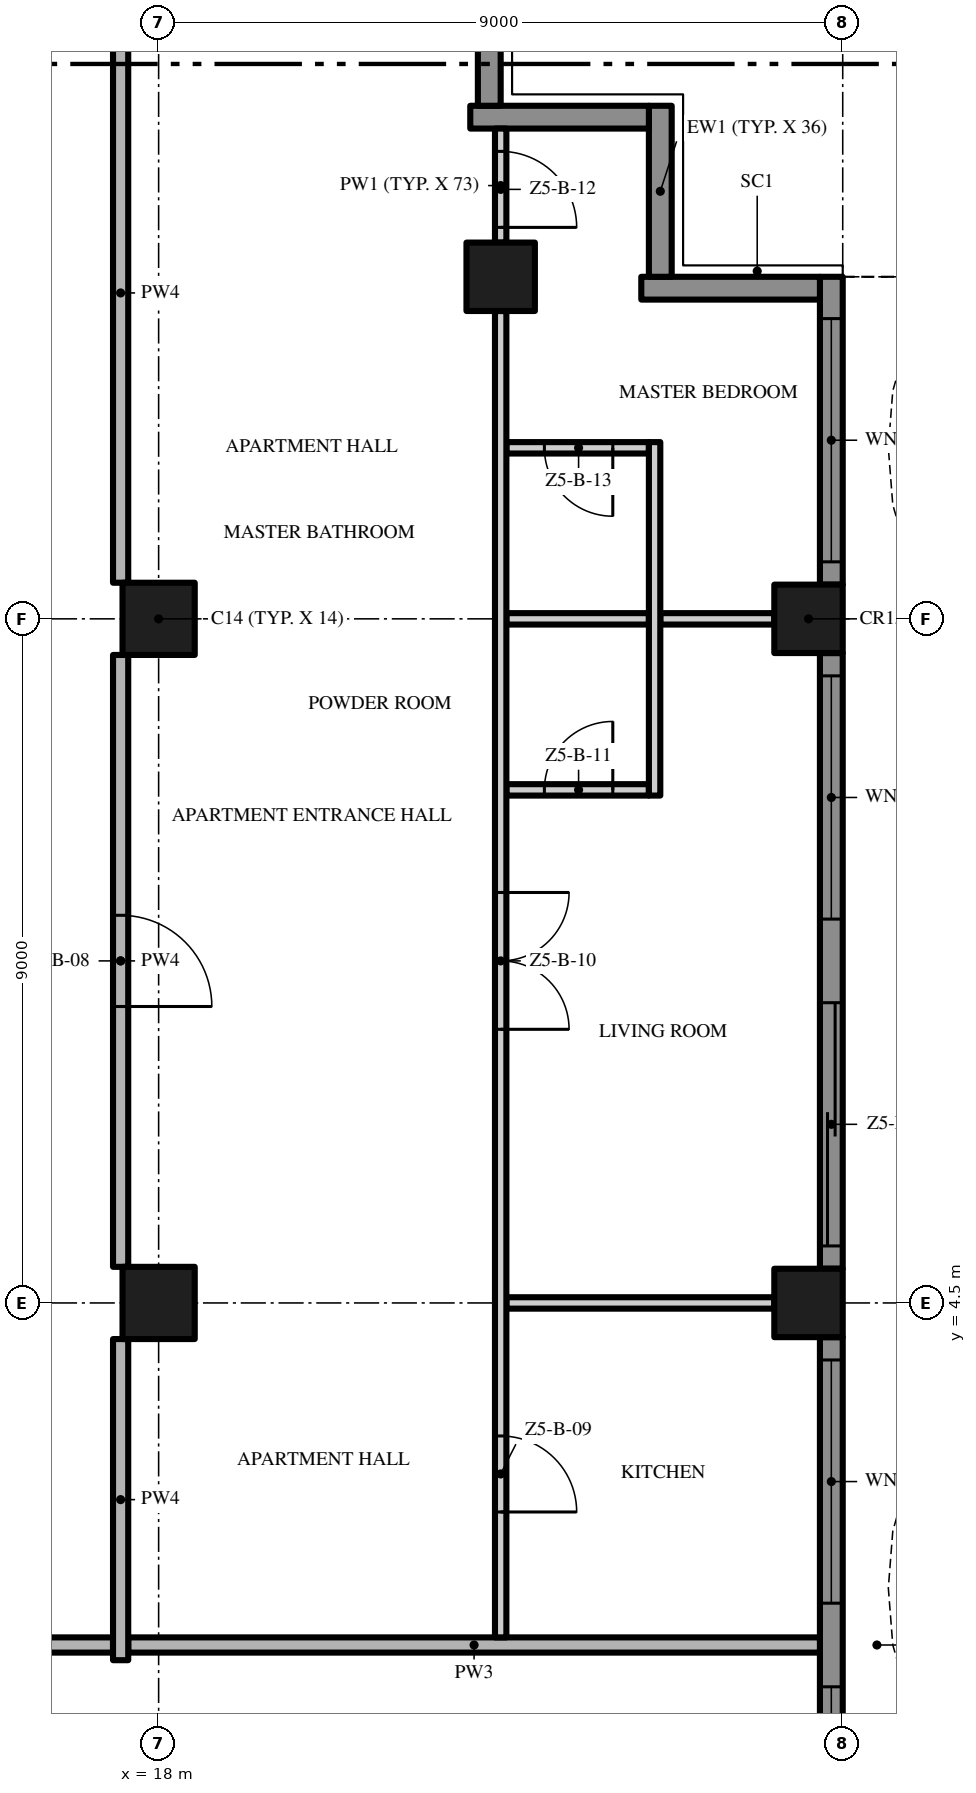
"""IFC4 building model, lengths in metres.
Left out: names, types, materials, properties, quantities, classifications, styles, units other than length and angle.
Written with IfcOpenShell. Run it as: python <this file> out.ifc"""

import sys

from ifc_helpers import new_model, si_unit, direction, frame, frame_2d, origin, origin_2d, place, context, subcontext, project, spatial, polyline, rectangle, outline, extrude, element, fill, save


model = new_model("IFC4")
c1 = context("Model", 3, precision=1e-05, world=origin(), true_north=direction((0.0, 1.0)))
c2 = subcontext(c1, "Body", "Model", "MODEL_VIEW")
j1 = project(units=[si_unit("LENGTHUNIT", "METRE"), si_unit("PLANEANGLEUNIT", "RADIAN")], contexts=[c1])
p1 = place(None, origin())
s1 = spatial("IfcSite", under=j1, at=p1, CompositionType="ELEMENT")
p2 = place(p1, origin())
s2 = spatial("IfcBuilding", under=s1, at=p2, CompositionType="ELEMENT")
p3 = place(p2, frame((0.0, 0.0, 257.8)))
s3 = spatial("IfcBuildingStorey", under=s2, at=p3, CompositionType="ELEMENT", Elevation=257.8)
for number, where, z_axis, x_axis in (
    (1, (18.0, 13.5, 0.0), (0.0, 0.0, 1.0), (1.0, 0.0, 0.0)),
    (2, (18.0, 4.5, 0.0), (0.0, 0.0, 1.0), (1.0, 0.0, 0.0)),
):
    element("IfcColumn", number, at=place(p3, frame(where, z_axis=z_axis, x_axis=x_axis)), inside=s3, PredefinedType="COLUMN", context=c2, shape_type="SweptSolid", body=[
        extrude(rectangle(XDim=0.95, YDim=0.95, at=origin_2d()), origin(), (0.0, 0.0, 1.0), 3.5),
    ])
for number, where, z_axis, x_axis in (
    (3, (26.55, 13.5, 0.0), (0.0, 0.0, 1.0), (1.0, 0.0, 0.0)),
    (4, (22.5, 18.0, 0.0), (0.0, 0.0, 1.0), (1.0, 0.0, 0.0)),
    (5, (26.55, 4.5, 0.0), (0.0, 0.0, 1.0), (1.0, 0.0, 0.0)),
):
    element("IfcColumn", number, at=place(p3, frame(where, z_axis=z_axis, x_axis=x_axis)), inside=s3, PredefinedType="COLUMN", context=c2, shape_type="SweptSolid", body=[
        extrude(rectangle(XDim=0.9, YDim=0.9, at=origin_2d()), origin(), (0.0, 0.0, 1.0), 3.5),
    ])
p4 = place(p3, frame((26.85, 4.05, 0.0), z_axis=(0.0, 0.0, 1.0), x_axis=(0.0, -1.0, 0.0)))
e6 = element("IfcWall", 6, at=p4, inside=s3, PredefinedType="SOLIDWALL", context=c2, shape_type="SweptSolid", body=[
    extrude(rectangle(XDim=8.1, YDim=0.3, at=frame_2d((4.05, 0.0))), origin(), (0.0, 0.0, 1.0), 3.5),
])
p5 = place(p4, frame((4.6, 0.0, 0.45)))
e7 = element("IfcOpeningElement", 7, at=p5, cuts=e6, PredefinedType="OPENING", context=c2, shape_type="SweptSolid", body=[
    extrude(rectangle(XDim=3.2, YDim=2.65, at=frame_2d((1.6, 1.325))), frame((0.0, 0.16, 0.0), z_axis=(0.0, -1.0, 0.0), x_axis=(1.0, 0.0, 0.0)), (0.0, 0.0, 1.0), 0.32),
])
p6 = place(p4, frame((0.3, 0.0, 0.45)))
e8 = element("IfcOpeningElement", 8, at=p6, cuts=e6, PredefinedType="OPENING", context=c2, shape_type="SweptSolid", body=[
    extrude(rectangle(XDim=3.2, YDim=2.65, at=frame_2d((1.6, 1.325))), frame((0.0, 0.16, 0.0), z_axis=(0.0, -1.0, 0.0), x_axis=(1.0, 0.0, 0.0)), (0.0, 0.0, 1.0), 0.32),
])
p7 = place(p3, frame((26.85, 13.05, 0.0), z_axis=(0.0, 0.0, 1.0), x_axis=(0.0, -1.0, 0.0)))
e9 = element("IfcWall", 9, at=p7, inside=s3, PredefinedType="SOLIDWALL", context=c2, shape_type="SweptSolid", body=[
    extrude(rectangle(XDim=8.1, YDim=0.3, at=frame_2d((4.05, 0.0))), origin(), (0.0, 0.0, 1.0), 3.5),
])
p8 = place(p7, frame((4.6, 0.0, 0.0)))
e10 = element("IfcOpeningElement", 10, at=p8, cuts=e9, PredefinedType="OPENING", context=c2, shape_type="SweptSolid", body=[
    extrude(rectangle(XDim=3.2, YDim=2.4, at=frame_2d((1.6, 1.2))), frame((0.0, 0.16, 0.0), z_axis=(0.0, -1.0, 0.0), x_axis=(1.0, 0.0, 0.0)), (0.0, 0.0, 1.0), 0.32),
])
p9 = place(p7, frame((0.3, 0.0, 0.45)))
e11 = element("IfcOpeningElement", 11, at=p9, cuts=e9, PredefinedType="OPENING", context=c2, shape_type="SweptSolid", body=[
    extrude(rectangle(XDim=3.2, YDim=2.65, at=frame_2d((1.6, 1.325))), frame((0.0, 0.16, 0.0), z_axis=(0.0, -1.0, 0.0), x_axis=(1.0, 0.0, 0.0)), (0.0, 0.0, 1.0), 0.32),
])
p10 = place(p3, frame((26.85, 18.0, 0.0), z_axis=(0.0, 0.0, 1.0), x_axis=(0.0, -1.0, 0.0)))
e12 = element("IfcWall", 12, at=p10, inside=s3, PredefinedType="SOLIDWALL", context=c2, shape_type="SweptSolid", body=[
    extrude(rectangle(XDim=4.05, YDim=0.3, at=frame_2d((2.025, 0.0))), origin(), (0.0, 0.0, 1.0), 3.5),
])
p11 = place(p10, frame((0.55, 0.0, 0.45)))
e13 = element("IfcOpeningElement", 13, at=p11, cuts=e12, PredefinedType="OPENING", context=c2, shape_type="SweptSolid", body=[
    extrude(rectangle(XDim=3.2, YDim=2.65, at=frame_2d((1.6, 1.325))), frame((0.0, 0.16, 0.0), z_axis=(0.0, -1.0, 0.0), x_axis=(1.0, 0.0, 0.0)), (0.0, 0.0, 1.0), 0.32),
])
p12 = place(p3, frame((24.35, 17.85, 0.0), z_axis=(0.0, 0.0, 1.0), x_axis=(1.0, 0.0, 0.0)))
e14 = element("IfcWall", 14, at=p12, inside=s3, PredefinedType="SOLIDWALL", context=c2, shape_type="SweptSolid", body=[
    extrude(rectangle(XDim=2.35, YDim=0.3, at=frame_2d((1.175, 0.0))), origin(), (0.0, 0.0, 1.0), 3.5),
])
p13 = place(p3, frame((24.6, 20.25, 0.0), z_axis=(0.0, 0.0, 1.0), x_axis=(0.0, -1.0, 0.0)))
e15 = element("IfcWall", 15, at=p13, inside=s3, PredefinedType="SOLIDWALL", context=c2, shape_type="SweptSolid", body=[
    extrude(rectangle(XDim=2.25, YDim=0.3, at=frame_2d((1.125, 0.0))), origin(), (0.0, 0.0, 1.0), 3.5),
])
p14 = place(p3, frame((22.1, 20.1, 0.0), z_axis=(0.0, 0.0, 1.0), x_axis=(1.0, 0.0, 0.0)))
e16 = element("IfcWall", 16, at=p14, inside=s3, PredefinedType="SOLIDWALL", context=c2, shape_type="SweptSolid", body=[
    extrude(rectangle(XDim=2.35, YDim=0.3, at=frame_2d((1.175, 0.0))), origin(), (0.0, 0.0, 1.0), 3.5),
])
p15 = place(p3, frame((22.35, 22.5, 0.0), z_axis=(0.0, 0.0, 1.0), x_axis=(0.0, -1.0, 0.0)))
e17 = element("IfcWall", 17, at=p15, inside=s3, PredefinedType="SOLIDWALL", context=c2, shape_type="SweptSolid", body=[
    extrude(rectangle(XDim=2.25, YDim=0.3, at=frame_2d((1.125, 0.0))), origin(), (0.0, 0.0, 1.0), 3.5),
])
p16 = place(p3, origin())
e18 = element("IfcWall", 18, at=p16, inside=s3, PredefinedType="USERDEFINED", context=c2, shape_type="SweptSolid", body=[
    extrude(outline(polyline([(28.8, -18.0), (28.095, -16.5), (27.659, -15.0), (27.6, -14.25), (27.659, -13.5), (28.095, -12.0), (28.8, -10.5), (29.505, -9.0), (29.941, -7.5), (30.0, -6.75), (29.941, -6.0), (29.505, -4.5), (28.8, -3.0), (28.095, -1.5), (27.659, 0.0), (27.6, 0.75), (27.659, 1.5), (28.095, 3.0), (28.8, 4.5), (29.505, 6.0), (29.941, 7.5), (30.0, 8.25), (29.941, 9.0), (29.505, 10.5), (28.8, 12.0), (28.095, 13.5), (27.659, 15.0), (27.6, 15.75), (27.659, 16.5), (28.095, 18.0), (27.855, 18.07), (27.411, 16.545), (27.349, 15.75), (27.411, 14.955), (27.86, 13.411), (28.574, 11.894), (29.271, 10.411), (29.694, 8.955), (29.749, 8.25), (29.694, 7.545), (29.271, 6.089), (28.574, 4.606), (27.86, 3.089), (27.411, 1.545), (27.349, 0.75), (27.411, -0.045), (27.86, -1.589), (28.574, -3.106), (29.271, -4.589), (29.694, -6.045), (29.749, -6.75), (29.694, -7.455), (29.271, -8.911), (28.574, -10.394), (27.86, -11.911), (27.411, -13.455), (27.349, -14.25), (27.411, -15.045), (27.86, -16.589), (28.574, -18.106), (28.8, -18.0)])), origin(), (0.0, 0.0, 1.0), 0.9),
])
p17 = place(p3, frame((17.4, 0.0, 0.0), z_axis=(0.0, 0.0, 1.0), x_axis=(-1.0, 0.0, 0.0)))
e19 = element("IfcWall", 19, at=p17, inside=s3, PredefinedType="PARTITIONING", context=c2, shape_type="SweptSolid", body=[
    extrude(rectangle(XDim=34.8, YDim=0.2, at=frame_2d((17.4, 0.0))), origin(), (0.0, 0.0, 1.0), 3.5),
])
p18 = place(p17, frame((23.4, 0.0, 0.0)))
e20 = element("IfcOpeningElement", 20, at=p18, cuts=e19, PredefinedType="OPENING", context=c2, shape_type="SweptSolid", body=[
    extrude(rectangle(XDim=1.5, YDim=2.4, at=frame_2d((0.75, 1.2))), frame((0.0, 0.11, 0.0), z_axis=(0.0, -1.0, 0.0), x_axis=(1.0, 0.0, 0.0)), (0.0, 0.0, 1.0), 0.22),
])
p19 = place(p17, frame((5.4, 0.0, 0.0)))
e21 = element("IfcOpeningElement", 21, at=p19, cuts=e19, PredefinedType="OPENING", context=c2, shape_type="SweptSolid", body=[
    extrude(rectangle(XDim=1.5, YDim=2.4, at=frame_2d((0.75, 1.2))), frame((0.0, 0.11, 0.0), z_axis=(0.0, -1.0, 0.0), x_axis=(1.0, 0.0, 0.0)), (0.0, 0.0, 1.0), 0.22),
])
p20 = place(p3, frame((17.6, 0.0, 0.0), z_axis=(0.0, 0.0, 1.0), x_axis=(1.0, 0.0, 0.0)))
e22 = element("IfcWall", 22, at=p20, inside=s3, PredefinedType="PARTITIONING", context=c2, shape_type="SweptSolid", body=[
    extrude(rectangle(XDim=9.1, YDim=0.2, at=frame_2d((4.55, 0.0))), origin(), (0.0, 0.0, 1.0), 3.5),
])
p21 = place(p3, frame((22.575, 4.5, 0.0), z_axis=(0.0, 0.0, 1.0), x_axis=(1.0, 0.0, 0.0)))
e23 = element("IfcWall", 23, at=p21, inside=s3, PredefinedType="PARTITIONING", context=c2, shape_type="SweptSolid", body=[
    extrude(rectangle(XDim=3.525, YDim=0.15, at=frame_2d((1.762, 0.0))), origin(), (0.0, 0.0, 1.0), 3.5),
])
p22 = place(p3, frame((22.575, 11.25, 0.0), z_axis=(0.0, 0.0, 1.0), x_axis=(1.0, 0.0, 0.0)))
e24 = element("IfcWall", 24, at=p22, inside=s3, PredefinedType="PARTITIONING", context=c2, shape_type="SweptSolid", body=[
    extrude(rectangle(XDim=1.875, YDim=0.15, at=frame_2d((0.938, 0.0))), origin(), (0.0, 0.0, 1.0), 3.5),
])
p23 = place(p22, frame((0.5, 0.0, 0.0)))
e25 = element("IfcOpeningElement", 25, at=p23, cuts=e24, PredefinedType="OPENING", context=c2, shape_type="SweptSolid", body=[
    extrude(rectangle(XDim=0.9, YDim=2.1, at=frame_2d((0.45, 1.05))), frame((0.0, 0.085, 0.0), z_axis=(0.0, -1.0, 0.0), x_axis=(1.0, 0.0, 0.0)), (0.0, 0.0, 1.0), 0.17),
])
p24 = place(p3, frame((22.575, 13.5, 0.0), z_axis=(0.0, 0.0, 1.0), x_axis=(1.0, 0.0, 0.0)))
e26 = element("IfcWall", 26, at=p24, inside=s3, PredefinedType="PARTITIONING", context=c2, shape_type="SweptSolid", body=[
    extrude(rectangle(XDim=1.875, YDim=0.15, at=frame_2d((0.938, 0.0))), origin(), (0.0, 0.0, 1.0), 3.5),
])
p25 = place(p3, frame((24.6, 13.5, 0.0), z_axis=(0.0, 0.0, 1.0), x_axis=(1.0, 0.0, 0.0)))
e27 = element("IfcWall", 27, at=p25, inside=s3, PredefinedType="PARTITIONING", context=c2, shape_type="SweptSolid", body=[
    extrude(rectangle(XDim=1.5, YDim=0.15, at=frame_2d((0.75, 0.0))), origin(), (0.0, 0.0, 1.0), 3.5),
])
p26 = place(p3, frame((24.45, 15.75, 0.0), z_axis=(0.0, 0.0, 1.0), x_axis=(-1.0, 0.0, 0.0)))
e28 = element("IfcWall", 28, at=p26, inside=s3, PredefinedType="PARTITIONING", context=c2, shape_type="SweptSolid", body=[
    extrude(rectangle(XDim=1.875, YDim=0.15, at=frame_2d((0.938, 0.0))), origin(), (0.0, 0.0, 1.0), 3.5),
])
p27 = place(p26, frame((0.475, 0.0, 0.0)))
e29 = element("IfcOpeningElement", 29, at=p27, cuts=e28, PredefinedType="OPENING", context=c2, shape_type="SweptSolid", body=[
    extrude(rectangle(XDim=0.9, YDim=2.1, at=frame_2d((0.45, 1.05))), frame((0.0, 0.085, 0.0), z_axis=(0.0, -1.0, 0.0), x_axis=(1.0, 0.0, 0.0)), (0.0, 0.0, 1.0), 0.17),
])
p28 = place(p3, frame((17.5, -0.2, 0.0), z_axis=(0.0, 0.0, 1.0), x_axis=(0.0, 1.0, 0.0)))
e30 = element("IfcWall", 30, at=p28, inside=s3, PredefinedType="PARTITIONING", context=c2, shape_type="SweptSolid", body=[
    extrude(rectangle(XDim=4.225, YDim=0.2, at=frame_2d((2.112, 0.0))), origin(), (0.0, 0.0, 1.0), 3.5),
])
p29 = place(p3, frame((17.5, 13.025, 0.0), z_axis=(0.0, 0.0, 1.0), x_axis=(0.0, -1.0, 0.0)))
e31 = element("IfcWall", 31, at=p29, inside=s3, PredefinedType="PARTITIONING", context=c2, shape_type="SweptSolid", body=[
    extrude(rectangle(XDim=8.05, YDim=0.2, at=frame_2d((4.025, 0.0))), origin(), (0.0, 0.0, 1.0), 3.5),
])
p30 = place(p29, frame((3.425, 0.0, 0.0)))
e32 = element("IfcOpeningElement", 32, at=p30, cuts=e31, PredefinedType="OPENING", context=c2, shape_type="SweptSolid", body=[
    extrude(rectangle(XDim=1.2, YDim=2.4, at=frame_2d((0.6, 1.2))), frame((0.0, 0.11, 0.0), z_axis=(0.0, -1.0, 0.0), x_axis=(1.0, 0.0, 0.0)), (0.0, 0.0, 1.0), 0.22),
])
p31 = place(p3, frame((17.5, 13.975, 0.0), z_axis=(0.0, 0.0, 1.0), x_axis=(0.0, 1.0, 0.0)))
e33 = element("IfcWall", 33, at=p31, inside=s3, PredefinedType="PARTITIONING", context=c2, shape_type="SweptSolid", body=[
    extrude(rectangle(XDim=7.625, YDim=0.2, at=frame_2d((3.812, 0.0))), origin(), (0.0, 0.0, 1.0), 3.5),
])
p32 = place(p3, frame((22.5, 17.55, 0.0), z_axis=(0.0, 0.0, 1.0), x_axis=(0.0, -1.0, 0.0)))
e34 = element("IfcWall", 34, at=p32, inside=s3, PredefinedType="PARTITIONING", context=c2, shape_type="SweptSolid", body=[
    extrude(rectangle(XDim=17.45, YDim=0.15, at=frame_2d((8.725, 0.0))), origin(), (0.0, 0.0, 1.0), 3.5),
])
p33 = place(p32, frame((14.8, 0.0, 0.0)))
e35 = element("IfcOpeningElement", 35, at=p33, cuts=e34, PredefinedType="OPENING", context=c2, shape_type="SweptSolid", body=[
    extrude(rectangle(XDim=1.0, YDim=2.4, at=frame_2d((0.5, 1.2))), frame((0.0, 0.085, 0.0), z_axis=(0.0, -1.0, 0.0), x_axis=(1.0, 0.0, 0.0)), (0.0, 0.0, 1.0), 0.17),
])
p34 = place(p32, frame((7.65, 0.0, 0.0)))
e36 = element("IfcOpeningElement", 36, at=p34, cuts=e34, PredefinedType="OPENING", context=c2, shape_type="SweptSolid", body=[
    extrude(rectangle(XDim=1.8, YDim=2.4, at=frame_2d((0.9, 1.2))), frame((0.0, 0.085, 0.0), z_axis=(0.0, -1.0, 0.0), x_axis=(1.0, 0.0, 0.0)), (0.0, 0.0, 1.0), 0.17),
])
p35 = place(p3, frame((22.5, 19.95, 0.0), z_axis=(0.0, 0.0, 1.0), x_axis=(0.0, -1.0, 0.0)))
e37 = element("IfcWall", 37, at=p35, inside=s3, PredefinedType="PARTITIONING", context=c2, shape_type="SweptSolid", body=[
    extrude(rectangle(XDim=1.5, YDim=0.15, at=frame_2d((0.75, 0.0))), origin(), (0.0, 0.0, 1.0), 3.5),
])
p36 = place(p35, frame((0.3, 0.0, 0.0)))
e38 = element("IfcOpeningElement", 38, at=p36, cuts=e37, PredefinedType="OPENING", context=c2, shape_type="SweptSolid", body=[
    extrude(rectangle(XDim=1.0, YDim=2.4, at=frame_2d((0.5, 1.2))), frame((0.0, 0.085, 0.0), z_axis=(0.0, -1.0, 0.0), x_axis=(1.0, 0.0, 0.0)), (0.0, 0.0, 1.0), 0.17),
])
p37 = place(p3, frame((24.525, 11.175, 0.0), z_axis=(0.0, 0.0, 1.0), x_axis=(0.0, 1.0, 0.0)))
e39 = element("IfcWall", 39, at=p37, inside=s3, PredefinedType="PARTITIONING", context=c2, shape_type="SweptSolid", body=[
    extrude(rectangle(XDim=4.65, YDim=0.15, at=frame_2d((2.325, 0.0))), origin(), (0.0, 0.0, 1.0), 3.5),
])
p38 = place(p5, origin())
e40 = element("IfcWindow", 40, at=p38, inside=s3, PartitioningType="SINGLE_PANEL", PredefinedType="WINDOW", context=c2, shape_type="SweptSolid", body=[
    extrude(rectangle(XDim=3.2, YDim=2.65, at=frame_2d((1.6, 1.325))), frame((0.0, 0.03, 0.0), z_axis=(0.0, -1.0, 0.0), x_axis=(1.0, 0.0, 0.0)), (0.0, 0.0, 1.0), 0.06),
])
fill(e7, e40)
p39 = place(p6, origin())
e41 = element("IfcWindow", 41, at=p39, inside=s3, PartitioningType="SINGLE_PANEL", PredefinedType="WINDOW", context=c2, shape_type="SweptSolid", body=[
    extrude(rectangle(XDim=3.2, YDim=2.65, at=frame_2d((1.6, 1.325))), frame((0.0, 0.03, 0.0), z_axis=(0.0, -1.0, 0.0), x_axis=(1.0, 0.0, 0.0)), (0.0, 0.0, 1.0), 0.06),
])
fill(e8, e41)
p40 = place(p8, origin())
e42 = element("IfcDoor", 42, at=p40, inside=s3, OperationType="SINGLE_SWING_LEFT", PredefinedType="DOOR", context=c2, shape_type="SweptSolid", body=[
    extrude(rectangle(XDim=3.2, YDim=2.4, at=frame_2d((1.6, 1.2))), frame((0.0, 0.025, 0.0), z_axis=(0.0, -1.0, 0.0), x_axis=(1.0, 0.0, 0.0)), (0.0, 0.0, 1.0), 0.05),
])
fill(e10, e42)
p41 = place(p9, origin())
e43 = element("IfcWindow", 43, at=p41, inside=s3, PartitioningType="SINGLE_PANEL", PredefinedType="WINDOW", context=c2, shape_type="SweptSolid", body=[
    extrude(rectangle(XDim=3.2, YDim=2.65, at=frame_2d((1.6, 1.325))), frame((0.0, 0.03, 0.0), z_axis=(0.0, -1.0, 0.0), x_axis=(1.0, 0.0, 0.0)), (0.0, 0.0, 1.0), 0.06),
])
fill(e11, e43)
p42 = place(p11, origin())
e44 = element("IfcWindow", 44, at=p42, inside=s3, PartitioningType="SINGLE_PANEL", PredefinedType="WINDOW", context=c2, shape_type="SweptSolid", body=[
    extrude(rectangle(XDim=3.2, YDim=2.65, at=frame_2d((1.6, 1.325))), frame((0.0, 0.03, 0.0), z_axis=(0.0, -1.0, 0.0), x_axis=(1.0, 0.0, 0.0)), (0.0, 0.0, 1.0), 0.06),
])
fill(e13, e44)
p43 = place(p30, origin())
e45 = element("IfcDoor", 45, at=p43, inside=s3, OperationType="SINGLE_SWING_RIGHT", PredefinedType="DOOR", context=c2, shape_type="SweptSolid", body=[
    extrude(rectangle(XDim=1.2, YDim=2.4, at=frame_2d((0.6, 1.2))), frame((0.0, 0.025, 0.0), z_axis=(0.0, -1.0, 0.0), x_axis=(1.0, 0.0, 0.0)), (0.0, 0.0, 1.0), 0.05),
])
fill(e32, e45)
p44 = place(p33, origin())
e46 = element("IfcDoor", 46, at=p44, inside=s3, OperationType="SINGLE_SWING_RIGHT", PredefinedType="DOOR", context=c2, shape_type="SweptSolid", body=[
    extrude(rectangle(XDim=1.0, YDim=2.4, at=frame_2d((0.5, 1.2))), frame((0.0, 0.025, 0.0), z_axis=(0.0, -1.0, 0.0), x_axis=(1.0, 0.0, 0.0)), (0.0, 0.0, 1.0), 0.05),
])
fill(e35, e46)
p45 = place(p34, origin())
e47 = element("IfcDoor", 47, at=p45, inside=s3, OperationType="DOUBLE_DOOR_SINGLE_SWING", PredefinedType="DOOR", context=c2, shape_type="SweptSolid", body=[
    extrude(rectangle(XDim=1.8, YDim=2.4, at=frame_2d((0.9, 1.2))), frame((0.0, 0.025, 0.0), z_axis=(0.0, -1.0, 0.0), x_axis=(1.0, 0.0, 0.0)), (0.0, 0.0, 1.0), 0.05),
])
fill(e36, e47)
p46 = place(p23, origin())
e48 = element("IfcDoor", 48, at=p46, inside=s3, OperationType="SINGLE_SWING_RIGHT", PredefinedType="DOOR", context=c2, shape_type="SweptSolid", body=[
    extrude(rectangle(XDim=0.9, YDim=2.1, at=frame_2d((0.45, 1.05))), frame((0.0, 0.025, 0.0), z_axis=(0.0, -1.0, 0.0), x_axis=(1.0, 0.0, 0.0)), (0.0, 0.0, 1.0), 0.05),
])
fill(e25, e48)
p47 = place(p36, origin())
e49 = element("IfcDoor", 49, at=p47, inside=s3, OperationType="SINGLE_SWING_RIGHT", PredefinedType="DOOR", context=c2, shape_type="SweptSolid", body=[
    extrude(rectangle(XDim=1.0, YDim=2.4, at=frame_2d((0.5, 1.2))), frame((0.0, 0.025, 0.0), z_axis=(0.0, -1.0, 0.0), x_axis=(1.0, 0.0, 0.0)), (0.0, 0.0, 1.0), 0.05),
])
fill(e38, e49)
p48 = place(p27, origin())
e50 = element("IfcDoor", 50, at=p48, inside=s3, OperationType="SINGLE_SWING_LEFT", PredefinedType="DOOR", context=c2, shape_type="SweptSolid", body=[
    extrude(rectangle(XDim=0.9, YDim=2.1, at=frame_2d((0.45, 1.05))), frame((0.0, 0.025, 0.0), z_axis=(0.0, -1.0, 0.0), x_axis=(1.0, 0.0, 0.0)), (0.0, 0.0, 1.0), 0.05),
])
fill(e29, e50)
save(model, sys.argv[1])
